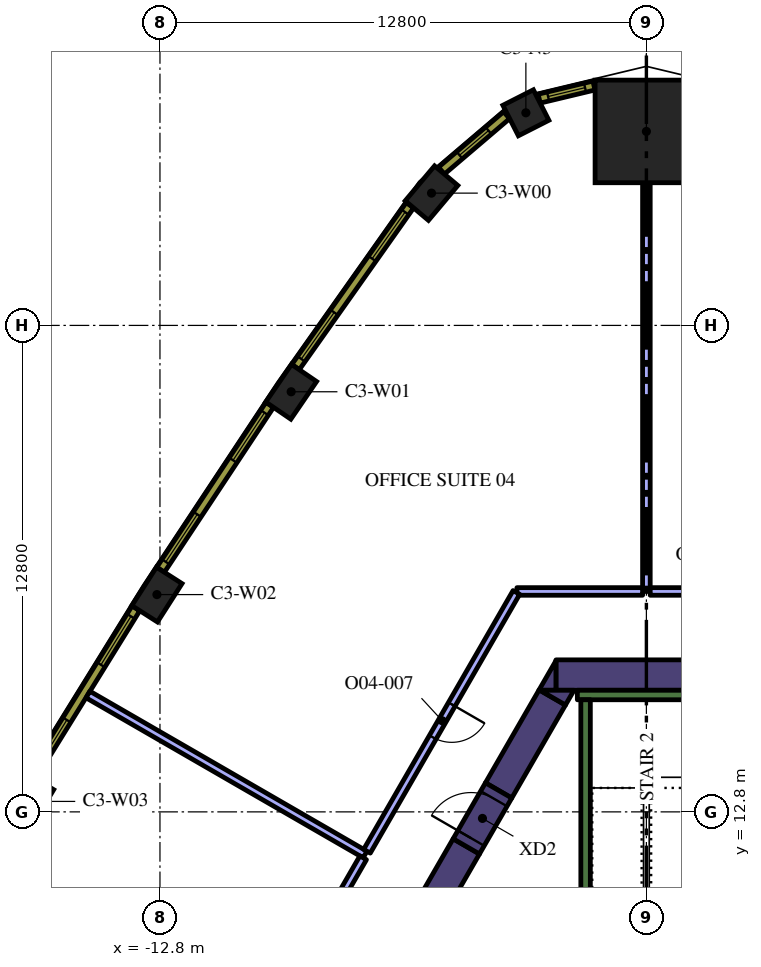
"""IFC4 building model, lengths in metres.
Left out: names, types, materials, properties, quantities, classifications, styles, units other than length and angle.
Written with IfcOpenShell. Run it as: python <this file> out.ifc"""

import sys

from ifc_helpers import new_model, si_unit, direction, frame, frame_2d, origin, origin_2d, place, context, subcontext, project, spatial, polyline, rectangle, outline, extrude, element, fill, save


model = new_model("IFC4")
c1 = context("Model", 3, precision=1e-05, world=origin(), true_north=direction((0.0, 1.0)))
c2 = subcontext(c1, "Body", "Model", "MODEL_VIEW")
j1 = project(units=[si_unit("LENGTHUNIT", "METRE"), si_unit("PLANEANGLEUNIT", "RADIAN")], contexts=[c1])
p1 = place(None, origin())
s1 = spatial("IfcSite", under=j1, at=p1, CompositionType="ELEMENT")
p2 = place(p1, origin())
s2 = spatial("IfcBuilding", under=s1, at=p2, CompositionType="ELEMENT")
p3 = place(p2, frame((0.0, 0.0, 179.4)))
s3 = spatial("IfcBuildingStorey", under=s2, at=p3, CompositionType="ELEMENT", Elevation=179.4)
p4 = place(p3, frame((0.0, 30.704, 0.0), z_axis=(0.0, 0.0, 1.0), x_axis=(0.0, 1.0, 0.0)))
e1 = element("IfcColumn", 1, at=p4, inside=s3, PredefinedType="COLUMN", context=c2, shape_type="SweptSolid", body=[
    extrude(rectangle(XDim=2.7, YDim=2.7, at=origin_2d()), origin(), (0.0, 0.0, 1.0), 4.2),
])
p5 = place(p3, frame((-3.171, 31.195, 0.0), z_axis=(0.0, 0.0, 1.0), x_axis=(-0.891486197647, -0.453047855535, 0.0)))
e2 = element("IfcColumn", 2, at=p5, inside=s3, PredefinedType="COLUMN", context=c2, shape_type="SweptSolid", body=[
    extrude(rectangle(XDim=0.9, YDim=0.9, at=origin_2d()), origin(), (0.0, 0.0, 1.0), 4.2),
])
for number, where, z_axis, x_axis in (
    (3, (-5.654, 29.081, 0.0), (0.0, 0.0, 1.0), (-0.644, -0.765, 0.0)),
    (4, (-9.348, 23.854, 0.0), (0.0, 0.0, 1.0), (-0.565, -0.825, 0.0)),
    (5, (-12.88, 18.517, 0.0), (0.0, 0.0, 1.0), (-0.539, -0.842, 0.0)),
    (6, (-16.247, 13.075, 0.0), (0.0, 0.0, 1.0), (-0.513, -0.858, 0.0)),
):
    element("IfcColumn", number, at=place(p3, frame(where, z_axis=z_axis, x_axis=x_axis)), inside=s3, PredefinedType="COLUMN", context=c2, shape_type="SweptSolid", body=[
        extrude(rectangle(XDim=1.2, YDim=0.8, at=origin_2d()), origin(), (0.0, 0.0, 1.0), 4.2),
    ])
p6 = place(p3, frame((-2.379, 16.4, 0.0), z_axis=(0.0, 0.0, 1.0), x_axis=(1.0, 0.0, 0.0)))
e7 = element("IfcWall", 7, at=p6, inside=s3, PredefinedType="SOLIDWALL", context=c2, shape_type="SweptSolid", body=[
    extrude(rectangle(XDim=3.824, YDim=0.8, at=frame_2d((1.912, 0.0))), origin(), (0.0, 0.0, 1.0), 4.2),
])
p7 = place(p3, origin())
e8 = element("IfcWall", 8, at=p7, inside=s3, PredefinedType="SOLIDWALL", context=c2, shape_type="SweptSolid", body=[
    extrude(outline(polyline([(-2.829, 16.0), (-2.381, 16.776), (-2.381, 16.0), (-2.829, 16.0)])), origin(), (0.0, 0.0, 1.0), 4.2),
])
p8 = place(p3, frame((-2.477, 15.81, 0.0), z_axis=(0.0, 0.0, 1.0), x_axis=(-0.499969377405, -0.866043083026, 0.0)))
e9 = element("IfcWall", 9, at=p8, inside=s3, PredefinedType="SOLIDWALL", context=c2, shape_type="SweptSolid", body=[
    extrude(rectangle(XDim=2.824, YDim=0.8, at=frame_2d((1.412, 0.0))), origin(), (0.0, 0.0, 1.0), 4.2),
])
e10 = element("IfcWall", 10, at=p7, inside=s3, PredefinedType="SOLIDWALL", context=c2, shape_type="SweptSolid", body=[
    extrude(outline(polyline([(-1.905, 16.0), (-2.129, 15.612), (-2.801, 16.0), (-1.905, 16.0)])), origin(), (0.0, 0.0, 1.0), 4.2),
])
p9 = place(p3, frame((-12.668, -1.842, 0.0), z_axis=(0.0, 0.0, 1.0), x_axis=(0.500003640647, 0.866023301845, 0.0)))
e11 = element("IfcWall", 11, at=p9, inside=s3, PredefinedType="SOLIDWALL", context=c2, shape_type="SweptSolid", body=[
    extrude(rectangle(XDim=15.858, YDim=0.8, at=frame_2d((7.929, 0.0))), origin(), (0.0, 0.0, 1.0), 4.2),
])
p10 = place(p3, frame((-1.817, 15.875, 0.0), z_axis=(0.0, 0.0, 1.0), x_axis=(1.0, 0.0, 0.0)))
e12 = element("IfcWall", 12, at=p10, inside=s3, PredefinedType="SOLIDWALL", context=c2, shape_type="SweptSolid", body=[
    extrude(rectangle(XDim=3.634, YDim=0.25, at=frame_2d((1.817, 0.0))), origin(), (0.0, 0.0, 1.0), 4.2),
])
p11 = place(p3, frame((-1.6, 8.7, 0.0), z_axis=(0.0, 0.0, 1.0), x_axis=(0.0, 1.0, 0.0)))
e13 = element("IfcWall", 13, at=p11, inside=s3, PredefinedType="SOLIDWALL", context=c2, shape_type="SweptSolid", body=[
    extrude(rectangle(XDim=7.05, YDim=0.25, at=frame_2d((3.525, 0.0))), origin(), (0.0, 0.0, 1.0), 4.2),
])
p12 = place(p3, frame((-4.739, 11.892, 0.0), z_axis=(0.0, 0.0, 1.0), x_axis=(0.500062241894, 0.865989465428, 0.0)))
e14 = element("IfcWall", 14, at=p12, inside=s3, PredefinedType="SOLIDWALL", context=c2, shape_type="SweptSolid", body=[
    extrude(rectangle(XDim=1.7, YDim=0.8, at=frame_2d((0.85, 0.0))), origin(), (0.0, 0.0, 1.0), 4.2),
])
p13 = place(p12, frame((0.25, 0.0, 0.0)))
e15 = element("IfcOpeningElement", 15, at=p13, cuts=e14, PredefinedType="OPENING", context=c2, shape_type="SweptSolid", body=[
    extrude(rectangle(XDim=1.2, YDim=2.1, at=frame_2d((0.6, 1.05))), frame((0.0, 0.41, 0.0), z_axis=(0.0, -1.0, 0.0), x_axis=(1.0, 0.0, 0.0)), (0.0, 0.0, 1.0), 0.82),
])
p14 = place(p3, frame((0.0, 18.6, 0.0), z_axis=(0.0, 0.0, 1.0), x_axis=(0.0, 1.0, 0.0)))
e16 = element("IfcWall", 16, at=p14, inside=s3, PredefinedType="PARTITIONING", context=c2, shape_type="SweptSolid", body=[
    extrude(rectangle(XDim=10.754, YDim=0.2, at=frame_2d((5.377, 0.0))), origin(), (0.0, 0.0, 1.0), 3.15),
])
p15 = place(p3, frame((3.274, 18.6, 0.0), z_axis=(0.0, 0.0, 1.0), x_axis=(-1.0, 0.0, 0.0)))
e17 = element("IfcWall", 17, at=p15, inside=s3, PredefinedType="PARTITIONING", context=c2, shape_type="SweptSolid", body=[
    extrude(rectangle(XDim=3.174, YDim=0.2, at=frame_2d((1.587, 0.0))), origin(), (0.0, 0.0, 1.0), 3.15),
])
p16 = place(p15, frame((1.1, 0.0, 0.0)))
e18 = element("IfcOpeningElement", 18, at=p16, cuts=e17, PredefinedType="OPENING", context=c2, shape_type="SweptSolid", body=[
    extrude(rectangle(XDim=1.0, YDim=2.1, at=frame_2d((0.5, 1.05))), frame((0.0, 0.11, 0.0), z_axis=(0.0, -1.0, 0.0), x_axis=(1.0, 0.0, 0.0)), (0.0, 0.0, 1.0), 0.22),
])
p17 = place(p3, frame((-7.403, 11.678, 0.0), z_axis=(0.0, 0.0, 1.0), x_axis=(-0.866029143232, 0.499993523031, 0.0)))
e19 = element("IfcWall", 19, at=p17, inside=s3, PredefinedType="PARTITIONING", context=c2, shape_type="SweptSolid", body=[
    extrude(rectangle(XDim=8.42, YDim=0.2, at=frame_2d((4.21, 0.0))), origin(), (0.0, 0.0, 1.0), 3.15),
])
p18 = place(p3, frame((-0.1, 18.6, 0.0), z_axis=(0.0, 0.0, 1.0), x_axis=(-1.0, 0.0, 0.0)))
e20 = element("IfcWall", 20, at=p18, inside=s3, PredefinedType="PARTITIONING", context=c2, shape_type="SweptSolid", body=[
    extrude(rectangle(XDim=3.306, YDim=0.2, at=frame_2d((1.653, 0.0))), origin(), (0.0, 0.0, 1.0), 3.15),
])
p19 = place(p3, frame((-3.421, 18.574, 0.0), z_axis=(0.0, 0.0, 1.0), x_axis=(-0.499989434416, -0.866031503741, 0.0)))
e21 = element("IfcWall", 21, at=p19, inside=s3, PredefinedType="PARTITIONING", context=c2, shape_type="SweptSolid", body=[
    extrude(rectangle(XDim=7.863, YDim=0.2, at=frame_2d((3.932, 0.0))), origin(), (0.0, 0.0, 1.0), 3.15),
])
p20 = place(p19, frame((3.4, 0.0, 0.0)))
e22 = element("IfcOpeningElement", 22, at=p20, cuts=e21, PredefinedType="OPENING", context=c2, shape_type="SweptSolid", body=[
    extrude(rectangle(XDim=1.0, YDim=2.1, at=frame_2d((0.5, 1.05))), frame((0.0, 0.11, 0.0), z_axis=(0.0, -1.0, 0.0), x_axis=(1.0, 0.0, 0.0)), (0.0, 0.0, 1.0), 0.22),
])
p21 = place(p3, frame((-7.453, 11.591, 0.0), z_axis=(0.0, 0.0, 1.0), x_axis=(-0.499980749935, -0.866036517529, 0.0)))
e23 = element("IfcWall", 23, at=p21, inside=s3, PredefinedType="PARTITIONING", context=c2, shape_type="SweptSolid", body=[
    extrude(rectangle(XDim=2.782, YDim=0.2, at=frame_2d((1.391, 0.0))), origin(), (0.0, 0.0, 1.0), 3.15),
])
p22 = place(p3, frame((-1.38, 31.912, 0.0), z_axis=(0.0, 0.0, 1.0), x_axis=(-0.972479955788, -0.232986556673, 0.0)))
e24 = element("IfcWall", 24, at=p22, inside=s3, PredefinedType="SOLIDWALL", context=c2, shape_type="SweptSolid", body=[
    extrude(rectangle(XDim=1.482, YDim=0.24, at=frame_2d((0.741, 0.0))), origin(), (0.0, 0.0, 1.0), 3.95),
])
p23 = place(p22, frame((0.241, 0.0, 0.9)))
e25 = element("IfcOpeningElement", 25, at=p23, cuts=e24, PredefinedType="OPENING", context=c2, shape_type="SweptSolid", body=[
    extrude(rectangle(XDim=1.0, YDim=2.55, at=frame_2d((0.5, 1.275))), frame((0.0, 0.13, 0.0), z_axis=(0.0, -1.0, 0.0), x_axis=(1.0, 0.0, 0.0)), (0.0, 0.0, 1.0), 0.26),
])
p24 = place(p3, frame((-3.678, 31.131, 0.0), z_axis=(0.0, 0.0, 1.0), x_axis=(-0.761419744247, -0.648259186645, 0.0)))
e26 = element("IfcWall", 26, at=p24, inside=s3, PredefinedType="SOLIDWALL", context=c2, shape_type="SweptSolid", body=[
    extrude(rectangle(XDim=2.25, YDim=0.24, at=frame_2d((1.125, 0.0))), origin(), (0.0, 0.0, 1.0), 3.95),
])
p25 = place(p24, frame((0.625, 0.0, 0.9)))
e27 = element("IfcOpeningElement", 27, at=p25, cuts=e26, PredefinedType="OPENING", context=c2, shape_type="SweptSolid", body=[
    extrude(rectangle(XDim=1.0, YDim=2.55, at=frame_2d((0.5, 1.275))), frame((0.0, 0.13, 0.0), z_axis=(0.0, -1.0, 0.0), x_axis=(1.0, 0.0, 0.0)), (0.0, 0.0, 1.0), 0.26),
])
p26 = place(p3, frame((-6.223, 28.762, 0.0), z_axis=(0.0, 0.0, 1.0), x_axis=(-0.577115207679, -0.816662743772, 0.0)))
e28 = element("IfcWall", 28, at=p26, inside=s3, PredefinedType="SOLIDWALL", context=c2, shape_type="SweptSolid", body=[
    extrude(rectangle(XDim=5.213, YDim=0.24, at=frame_2d((2.606, 0.0))), origin(), (0.0, 0.0, 1.0), 3.95),
])
p27 = place(p26, frame((0.221, 0.0, 0.9)))
e29 = element("IfcOpeningElement", 29, at=p27, cuts=e28, PredefinedType="OPENING", context=c2, shape_type="SweptSolid", body=[
    extrude(rectangle(XDim=1.5, YDim=2.55, at=frame_2d((0.75, 1.275))), frame((0.0, 0.13, 0.0), z_axis=(0.0, -1.0, 0.0), x_axis=(1.0, 0.0, 0.0)), (0.0, 0.0, 1.0), 0.26),
])
p28 = place(p26, frame((3.452, 0.0, 0.9)))
e30 = element("IfcOpeningElement", 30, at=p28, cuts=e28, PredefinedType="OPENING", context=c2, shape_type="SweptSolid", body=[
    extrude(rectangle(XDim=1.5, YDim=2.55, at=frame_2d((0.75, 1.275))), frame((0.0, 0.13, 0.0), z_axis=(0.0, -1.0, 0.0), x_axis=(1.0, 0.0, 0.0)), (0.0, 0.0, 1.0), 0.26),
])
p29 = place(p3, frame((-9.911, 23.51, 0.0), z_axis=(0.0, 0.0, 1.0), x_axis=(-0.551892811511, -0.833915058386, 0.0)))
e31 = element("IfcWall", 31, at=p29, inside=s3, PredefinedType="SOLIDWALL", context=c2, shape_type="SweptSolid", body=[
    extrude(rectangle(XDim=5.204, YDim=0.24, at=frame_2d((2.602, 0.0))), origin(), (0.0, 0.0, 1.0), 3.95),
])
p30 = place(p29, frame((0.248, 0.0, 0.9)))
e32 = element("IfcOpeningElement", 32, at=p30, cuts=e31, PredefinedType="OPENING", context=c2, shape_type="SweptSolid", body=[
    extrude(rectangle(XDim=1.5, YDim=2.55, at=frame_2d((0.75, 1.275))), frame((0.0, 0.13, 0.0), z_axis=(0.0, -1.0, 0.0), x_axis=(1.0, 0.0, 0.0)), (0.0, 0.0, 1.0), 0.26),
])
p31 = place(p29, frame((3.455, 0.0, 0.9)))
e33 = element("IfcOpeningElement", 33, at=p31, cuts=e31, PredefinedType="OPENING", context=c2, shape_type="SweptSolid", body=[
    extrude(rectangle(XDim=1.5, YDim=2.55, at=frame_2d((0.75, 1.275))), frame((0.0, 0.13, 0.0), z_axis=(0.0, -1.0, 0.0), x_axis=(1.0, 0.0, 0.0)), (0.0, 0.0, 1.0), 0.26),
])
p32 = place(p3, frame((-13.433, 18.156, 0.0), z_axis=(0.0, 0.0, 1.0), x_axis=(-0.526197926587, -0.850362124072, 0.0)))
e34 = element("IfcWall", 34, at=p32, inside=s3, PredefinedType="SOLIDWALL", context=c2, shape_type="SweptSolid", body=[
    extrude(rectangle(XDim=5.203, YDim=0.24, at=frame_2d((2.602, 0.0))), origin(), (0.0, 0.0, 1.0), 3.95),
])
p33 = place(p32, frame((0.248, 0.0, 0.9)))
e35 = element("IfcOpeningElement", 35, at=p33, cuts=e34, PredefinedType="OPENING", context=c2, shape_type="SweptSolid", body=[
    extrude(rectangle(XDim=1.5, YDim=2.55, at=frame_2d((0.75, 1.275))), frame((0.0, 0.13, 0.0), z_axis=(0.0, -1.0, 0.0), x_axis=(1.0, 0.0, 0.0)), (0.0, 0.0, 1.0), 0.26),
])
p34 = place(p32, frame((3.455, 0.0, 0.9)))
e36 = element("IfcOpeningElement", 36, at=p34, cuts=e34, PredefinedType="OPENING", context=c2, shape_type="SweptSolid", body=[
    extrude(rectangle(XDim=1.5, YDim=2.55, at=frame_2d((0.75, 1.275))), frame((0.0, 0.13, 0.0), z_axis=(0.0, -1.0, 0.0), x_axis=(1.0, 0.0, 0.0)), (0.0, 0.0, 1.0), 0.26),
])
p35 = place(p13, origin())
e37 = element("IfcDoor", 37, at=p35, inside=s3, OperationType="SINGLE_SWING_LEFT", PredefinedType="DOOR", context=c2, shape_type="SweptSolid", body=[
    extrude(rectangle(XDim=1.2, YDim=2.1, at=frame_2d((0.6, 1.05))), frame((0.0, 0.025, 0.0), z_axis=(0.0, -1.0, 0.0), x_axis=(1.0, 0.0, 0.0)), (0.0, 0.0, 1.0), 0.05),
])
fill(e15, e37)
p36 = place(p20, origin())
e38 = element("IfcDoor", 38, at=p36, inside=s3, OperationType="SINGLE_SWING_LEFT", PredefinedType="DOOR", context=c2, shape_type="SweptSolid", body=[
    extrude(rectangle(XDim=1.0, YDim=2.1, at=frame_2d((0.5, 1.05))), frame((0.0, 0.025, 0.0), z_axis=(0.0, -1.0, 0.0), x_axis=(1.0, 0.0, 0.0)), (0.0, 0.0, 1.0), 0.05),
])
fill(e22, e38)
p37 = place(p23, origin())
e39 = element("IfcWindow", 39, at=p37, inside=s3, PartitioningType="SINGLE_PANEL", PredefinedType="WINDOW", context=c2, shape_type="SweptSolid", body=[
    extrude(rectangle(XDim=1.0, YDim=2.55, at=frame_2d((0.5, 1.275))), frame((0.0, 0.04, 0.0), z_axis=(0.0, -1.0, 0.0), x_axis=(1.0, 0.0, 0.0)), (0.0, 0.0, 1.0), 0.06),
])
fill(e25, e39)
p38 = place(p25, origin())
e40 = element("IfcWindow", 40, at=p38, inside=s3, PartitioningType="SINGLE_PANEL", PredefinedType="WINDOW", context=c2, shape_type="SweptSolid", body=[
    extrude(rectangle(XDim=1.0, YDim=2.55, at=frame_2d((0.5, 1.275))), frame((0.0, 0.04, 0.0), z_axis=(0.0, -1.0, 0.0), x_axis=(1.0, 0.0, 0.0)), (0.0, 0.0, 1.0), 0.06),
])
fill(e27, e40)
p39 = place(p27, origin())
e41 = element("IfcWindow", 41, at=p39, inside=s3, PartitioningType="SINGLE_PANEL", PredefinedType="WINDOW", context=c2, shape_type="SweptSolid", body=[
    extrude(rectangle(XDim=1.5, YDim=2.55, at=frame_2d((0.75, 1.275))), frame((0.0, 0.04, 0.0), z_axis=(0.0, -1.0, 0.0), x_axis=(1.0, 0.0, 0.0)), (0.0, 0.0, 1.0), 0.06),
])
fill(e29, e41)
p40 = place(p28, origin())
e42 = element("IfcWindow", 42, at=p40, inside=s3, PartitioningType="SINGLE_PANEL", PredefinedType="WINDOW", context=c2, shape_type="SweptSolid", body=[
    extrude(rectangle(XDim=1.5, YDim=2.55, at=frame_2d((0.75, 1.275))), frame((0.0, 0.04, 0.0), z_axis=(0.0, -1.0, 0.0), x_axis=(1.0, 0.0, 0.0)), (0.0, 0.0, 1.0), 0.06),
])
fill(e30, e42)
p41 = place(p30, origin())
e43 = element("IfcWindow", 43, at=p41, inside=s3, PartitioningType="SINGLE_PANEL", PredefinedType="WINDOW", context=c2, shape_type="SweptSolid", body=[
    extrude(rectangle(XDim=1.5, YDim=2.55, at=frame_2d((0.75, 1.275))), frame((0.0, 0.04, 0.0), z_axis=(0.0, -1.0, 0.0), x_axis=(1.0, 0.0, 0.0)), (0.0, 0.0, 1.0), 0.06),
])
fill(e32, e43)
p42 = place(p31, origin())
e44 = element("IfcWindow", 44, at=p42, inside=s3, PartitioningType="SINGLE_PANEL", PredefinedType="WINDOW", context=c2, shape_type="SweptSolid", body=[
    extrude(rectangle(XDim=1.5, YDim=2.55, at=frame_2d((0.75, 1.275))), frame((0.0, 0.04, 0.0), z_axis=(0.0, -1.0, 0.0), x_axis=(1.0, 0.0, 0.0)), (0.0, 0.0, 1.0), 0.06),
])
fill(e33, e44)
p43 = place(p33, origin())
e45 = element("IfcWindow", 45, at=p43, inside=s3, PartitioningType="SINGLE_PANEL", PredefinedType="WINDOW", context=c2, shape_type="SweptSolid", body=[
    extrude(rectangle(XDim=1.5, YDim=2.55, at=frame_2d((0.75, 1.275))), frame((0.0, 0.04, 0.0), z_axis=(0.0, -1.0, 0.0), x_axis=(1.0, 0.0, 0.0)), (0.0, 0.0, 1.0), 0.06),
])
fill(e35, e45)
p44 = place(p34, origin())
e46 = element("IfcWindow", 46, at=p44, inside=s3, PartitioningType="SINGLE_PANEL", PredefinedType="WINDOW", context=c2, shape_type="SweptSolid", body=[
    extrude(rectangle(XDim=1.5, YDim=2.55, at=frame_2d((0.75, 1.275))), frame((0.0, 0.04, 0.0), z_axis=(0.0, -1.0, 0.0), x_axis=(1.0, 0.0, 0.0)), (0.0, 0.0, 1.0), 0.06),
])
fill(e36, e46)
save(model, sys.argv[1])
